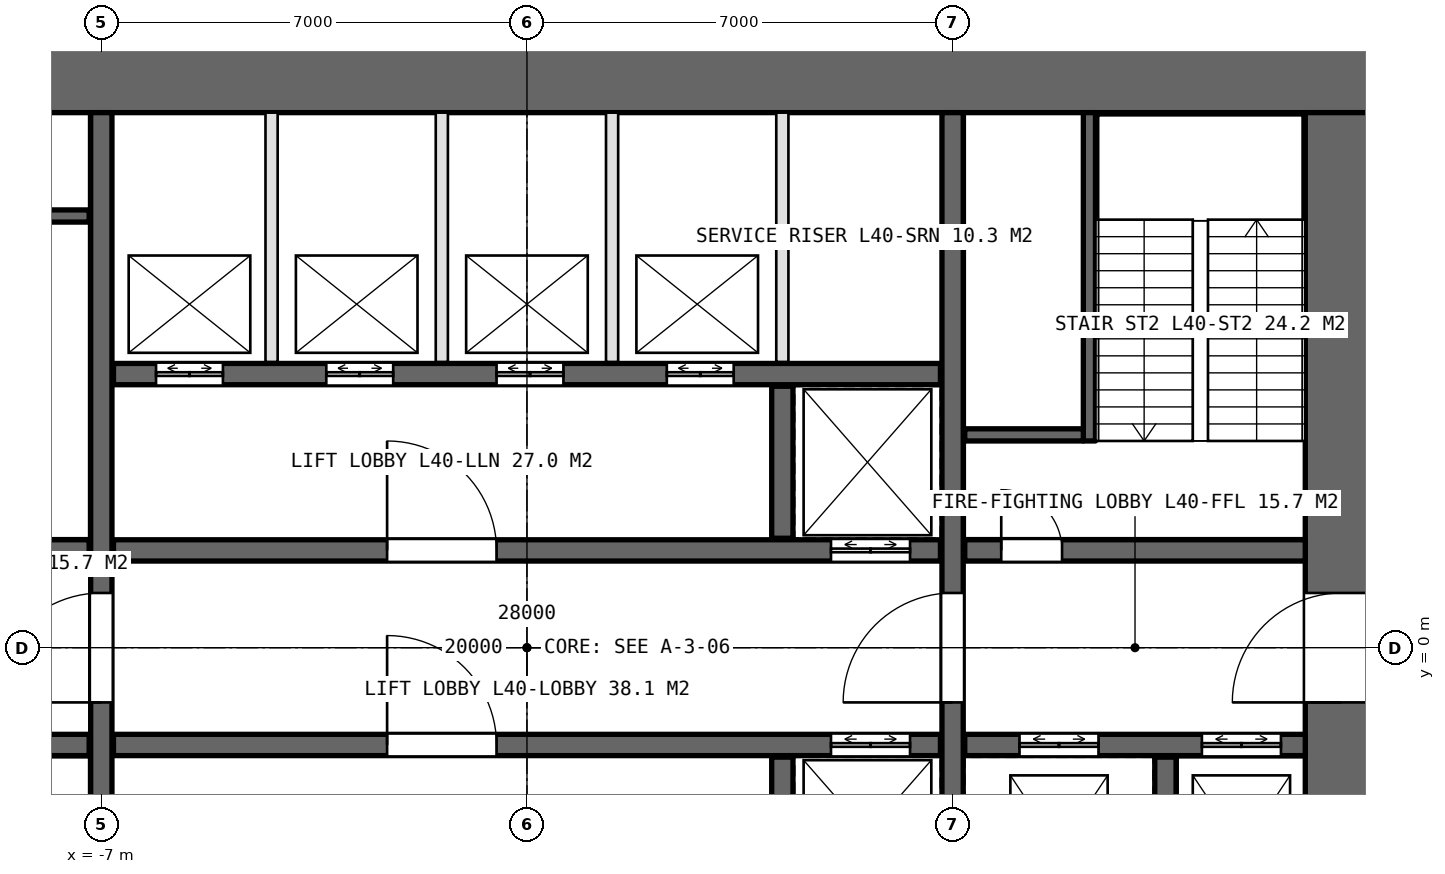
"""IFC4 building model, lengths in metres.
Left out: names, types, materials, properties, quantities, classifications, styles, units other than length and angle.
Written with IfcOpenShell. Run it as: python <this file> out.ifc"""

import sys

from ifc_helpers import new_model, si_unit, direction, frame, frame_2d, origin, place, context, subcontext, project, spatial, rectangle, extrude, element, fill, save


model = new_model("IFC4")
c1 = context("Model", 3, precision=1e-05, world=origin(), true_north=direction((0.0, 1.0)))
c2 = subcontext(c1, "Body", "Model", "MODEL_VIEW")
j1 = project(units=[si_unit("LENGTHUNIT", "METRE"), si_unit("PLANEANGLEUNIT", "RADIAN")], contexts=[c1])
p1 = place(None, origin())
s1 = spatial("IfcSite", under=j1, at=p1, CompositionType="ELEMENT")
p2 = place(p1, origin())
s2 = spatial("IfcBuilding", under=s1, at=p2, CompositionType="ELEMENT")
p3 = place(p2, frame((0.0, 0.0, 184.8)))
s3 = spatial("IfcBuildingStorey", under=s2, at=p3, CompositionType="ELEMENT", Elevation=184.8)
p4 = place(p3, frame((14.0, 9.4, 0.0), z_axis=(0.0, 0.0, 1.0), x_axis=(-1.0, 0.0, 0.0)))
e1 = element("IfcWall", 1, at=p4, inside=s3, PredefinedType="SHEAR", context=c2, shape_type="SweptSolid", body=[
    extrude(rectangle(XDim=28.0, YDim=1.2, at=frame_2d((14.0, 0.0))), origin(), (0.0, 0.0, 1.0), 5.0),
])
p5 = place(p4, frame((24.0, 0.0, 0.0)))
e2 = element("IfcOpeningElement", 2, at=p5, cuts=e1, PredefinedType="OPENING", context=c2, shape_type="SweptSolid", body=[
    extrude(rectangle(XDim=1.0, YDim=2.4, at=frame_2d((0.5, 1.2))), frame((0.0, 0.61, 0.0), z_axis=(0.0, -1.0, 0.0), x_axis=(1.0, 0.0, 0.0)), (0.0, 0.0, 1.0), 1.22),
])
p6 = place(p3, frame((13.4, -8.8, 0.0), z_axis=(0.0, 0.0, 1.0), x_axis=(0.0, 1.0, 0.0)))
e3 = element("IfcWall", 3, at=p6, inside=s3, PredefinedType="SHEAR", context=c2, shape_type="SweptSolid", body=[
    extrude(rectangle(XDim=17.6, YDim=1.2, at=frame_2d((8.8, 0.0))), origin(), (0.0, 0.0, 1.0), 5.0),
])
p7 = place(p6, frame((7.9, 0.0, 0.0)))
e4 = element("IfcOpeningElement", 4, at=p7, cuts=e3, PredefinedType="OPENING", context=c2, shape_type="SweptSolid", body=[
    extrude(rectangle(XDim=1.8, YDim=2.4, at=frame_2d((0.9, 1.2))), frame((0.0, 0.61, 0.0), z_axis=(0.0, -1.0, 0.0), x_axis=(1.0, 0.0, 0.0)), (0.0, 0.0, 1.0), 1.22),
])
p8 = place(p3, frame((-7.0, -8.8, 0.0), z_axis=(0.0, 0.0, 1.0), x_axis=(0.0, 1.0, 0.0)))
e5 = element("IfcWall", 5, at=p8, inside=s3, PredefinedType="SHEAR", context=c2, shape_type="SweptSolid", body=[
    extrude(rectangle(XDim=17.6, YDim=0.35, at=frame_2d((8.8, 0.0))), origin(), (0.0, 0.0, 1.0), 5.0),
])
p9 = place(p8, frame((7.9, 0.0, 0.0)))
e6 = element("IfcOpeningElement", 6, at=p9, cuts=e5, PredefinedType="OPENING", context=c2, shape_type="SweptSolid", body=[
    extrude(rectangle(XDim=1.8, YDim=2.4, at=frame_2d((0.9, 1.2))), frame((0.0, 0.185, 0.0), z_axis=(0.0, -1.0, 0.0), x_axis=(1.0, 0.0, 0.0)), (0.0, 0.0, 1.0), 0.37),
])
p10 = place(p3, frame((7.0, -8.8, 0.0), z_axis=(0.0, 0.0, 1.0), x_axis=(0.0, 1.0, 0.0)))
e7 = element("IfcWall", 7, at=p10, inside=s3, PredefinedType="SHEAR", context=c2, shape_type="SweptSolid", body=[
    extrude(rectangle(XDim=17.6, YDim=0.35, at=frame_2d((8.8, 0.0))), origin(), (0.0, 0.0, 1.0), 5.0),
])
p11 = place(p10, frame((7.9, 0.0, 0.0)))
e8 = element("IfcOpeningElement", 8, at=p11, cuts=e7, PredefinedType="OPENING", context=c2, shape_type="SweptSolid", body=[
    extrude(rectangle(XDim=1.8, YDim=2.4, at=frame_2d((0.9, 1.2))), frame((0.0, 0.185, 0.0), z_axis=(0.0, -1.0, 0.0), x_axis=(1.0, 0.0, 0.0)), (0.0, 0.0, 1.0), 0.37),
])
p12 = place(p3, frame((-6.8, 1.6, 0.0), z_axis=(0.0, 0.0, 1.0), x_axis=(1.0, 0.0, 0.0)))
e9 = element("IfcWall", 9, at=p12, inside=s3, PredefinedType="SHEAR", context=c2, shape_type="SweptSolid", body=[
    extrude(rectangle(XDim=13.6, YDim=0.35, at=frame_2d((6.8, 0.0))), origin(), (0.0, 0.0, 1.0), 5.0),
])
p13 = place(p12, frame((4.5, 0.0, 0.0)))
e10 = element("IfcOpeningElement", 10, at=p13, cuts=e9, PredefinedType="OPENING", context=c2, shape_type="SweptSolid", body=[
    extrude(rectangle(XDim=1.8, YDim=2.4, at=frame_2d((0.9, 1.2))), frame((0.0, 0.185, 0.0), z_axis=(0.0, -1.0, 0.0), x_axis=(1.0, 0.0, 0.0)), (0.0, 0.0, 1.0), 0.37),
])
p14 = place(p12, frame((11.8, 0.0, 0.0)))
e11 = element("IfcOpeningElement", 11, at=p14, cuts=e9, PredefinedType="OPENING", context=c2, shape_type="SweptSolid", body=[
    extrude(rectangle(XDim=1.3, YDim=2.4, at=frame_2d((0.65, 1.2))), frame((0.0, 0.185, 0.0), z_axis=(0.0, -1.0, 0.0), x_axis=(1.0, 0.0, 0.0)), (0.0, 0.0, 1.0), 0.37),
])
p15 = place(p3, frame((-6.8, -1.6, 0.0), z_axis=(0.0, 0.0, 1.0), x_axis=(1.0, 0.0, 0.0)))
e12 = element("IfcWall", 12, at=p15, inside=s3, PredefinedType="SHEAR", context=c2, shape_type="SweptSolid", body=[
    extrude(rectangle(XDim=13.6, YDim=0.35, at=frame_2d((6.8, 0.0))), origin(), (0.0, 0.0, 1.0), 5.0),
])
p16 = place(p15, frame((4.5, 0.0, 0.0)))
e13 = element("IfcOpeningElement", 13, at=p16, cuts=e12, PredefinedType="OPENING", context=c2, shape_type="SweptSolid", body=[
    extrude(rectangle(XDim=1.8, YDim=2.4, at=frame_2d((0.9, 1.2))), frame((0.0, 0.185, 0.0), z_axis=(0.0, -1.0, 0.0), x_axis=(1.0, 0.0, 0.0)), (0.0, 0.0, 1.0), 0.37),
])
p17 = place(p15, frame((11.8, 0.0, 0.0)))
e14 = element("IfcOpeningElement", 14, at=p17, cuts=e12, PredefinedType="OPENING", context=c2, shape_type="SweptSolid", body=[
    extrude(rectangle(XDim=1.3, YDim=2.4, at=frame_2d((0.65, 1.2))), frame((0.0, 0.185, 0.0), z_axis=(0.0, -1.0, 0.0), x_axis=(1.0, 0.0, 0.0)), (0.0, 0.0, 1.0), 0.37),
])
p18 = place(p3, frame((-6.8, 4.5, 0.0), z_axis=(0.0, 0.0, 1.0), x_axis=(1.0, 0.0, 0.0)))
e15 = element("IfcWall", 15, at=p18, inside=s3, PredefinedType="SHEAR", context=c2, shape_type="SweptSolid", body=[
    extrude(rectangle(XDim=13.6, YDim=0.35, at=frame_2d((6.8, 0.0))), origin(), (0.0, 0.0, 1.0), 5.0),
])
p19 = place(p18, frame((0.7, 0.0, 0.0)))
e16 = element("IfcOpeningElement", 16, at=p19, cuts=e15, PredefinedType="OPENING", context=c2, shape_type="SweptSolid", body=[
    extrude(rectangle(XDim=1.1, YDim=2.4, at=frame_2d((0.55, 1.2))), frame((0.0, 0.185, 0.0), z_axis=(0.0, -1.0, 0.0), x_axis=(1.0, 0.0, 0.0)), (0.0, 0.0, 1.0), 0.37),
])
p20 = place(p18, frame((3.5, 0.0, 0.0)))
e17 = element("IfcOpeningElement", 17, at=p20, cuts=e15, PredefinedType="OPENING", context=c2, shape_type="SweptSolid", body=[
    extrude(rectangle(XDim=1.1, YDim=2.4, at=frame_2d((0.55, 1.2))), frame((0.0, 0.185, 0.0), z_axis=(0.0, -1.0, 0.0), x_axis=(1.0, 0.0, 0.0)), (0.0, 0.0, 1.0), 0.37),
])
p21 = place(p18, frame((6.3, 0.0, 0.0)))
e18 = element("IfcOpeningElement", 18, at=p21, cuts=e15, PredefinedType="OPENING", context=c2, shape_type="SweptSolid", body=[
    extrude(rectangle(XDim=1.1, YDim=2.4, at=frame_2d((0.55, 1.2))), frame((0.0, 0.185, 0.0), z_axis=(0.0, -1.0, 0.0), x_axis=(1.0, 0.0, 0.0)), (0.0, 0.0, 1.0), 0.37),
])
p22 = place(p18, frame((9.1, 0.0, 0.0)))
e19 = element("IfcOpeningElement", 19, at=p22, cuts=e15, PredefinedType="OPENING", context=c2, shape_type="SweptSolid", body=[
    extrude(rectangle(XDim=1.1, YDim=2.4, at=frame_2d((0.55, 1.2))), frame((0.0, 0.185, 0.0), z_axis=(0.0, -1.0, 0.0), x_axis=(1.0, 0.0, 0.0)), (0.0, 0.0, 1.0), 0.37),
])
for number, where, z_axis, x_axis in (
    (20, (-12.8, 1.6, 0.0), (0.0, 0.0, 1.0), (1.0, 0.0, 0.0)),
    (21, (-12.8, -1.6, 0.0), (0.0, 0.0, 1.0), (1.0, 0.0, 0.0)),
):
    element("IfcWall", number, at=place(p3, frame(where, z_axis=z_axis, x_axis=x_axis)), inside=s3, PredefinedType="SHEAR", context=c2, shape_type="SweptSolid", body=[
        extrude(rectangle(XDim=5.6, YDim=0.35, at=frame_2d((2.8, 0.0))), origin(), (0.0, 0.0, 1.0), 5.0),
    ])
p23 = place(p3, frame((7.2, 1.6, 0.0), z_axis=(0.0, 0.0, 1.0), x_axis=(1.0, 0.0, 0.0)))
e22 = element("IfcWall", 22, at=p23, inside=s3, PredefinedType="SHEAR", context=c2, shape_type="SweptSolid", body=[
    extrude(rectangle(XDim=5.6, YDim=0.35, at=frame_2d((2.8, 0.0))), origin(), (0.0, 0.0, 1.0), 5.0),
])
p24 = place(p23, frame((0.6, 0.0, 0.0)))
e23 = element("IfcOpeningElement", 23, at=p24, cuts=e22, PredefinedType="OPENING", context=c2, shape_type="SweptSolid", body=[
    extrude(rectangle(XDim=1.0, YDim=2.4, at=frame_2d((0.5, 1.2))), frame((0.0, 0.185, 0.0), z_axis=(0.0, -1.0, 0.0), x_axis=(1.0, 0.0, 0.0)), (0.0, 0.0, 1.0), 0.37),
])
p25 = place(p3, frame((7.2, -1.6, 0.0), z_axis=(0.0, 0.0, 1.0), x_axis=(1.0, 0.0, 0.0)))
e24 = element("IfcWall", 24, at=p25, inside=s3, PredefinedType="SHEAR", context=c2, shape_type="SweptSolid", body=[
    extrude(rectangle(XDim=5.6, YDim=0.35, at=frame_2d((2.8, 0.0))), origin(), (0.0, 0.0, 1.0), 5.0),
])
p26 = place(p25, frame((0.9, 0.0, 0.0)))
e25 = element("IfcOpeningElement", 25, at=p26, cuts=e24, PredefinedType="OPENING", context=c2, shape_type="SweptSolid", body=[
    extrude(rectangle(XDim=1.3, YDim=2.4, at=frame_2d((0.65, 1.2))), frame((0.0, 0.185, 0.0), z_axis=(0.0, -1.0, 0.0), x_axis=(1.0, 0.0, 0.0)), (0.0, 0.0, 1.0), 0.37),
])
p27 = place(p25, frame((3.9, 0.0, 0.0)))
e26 = element("IfcOpeningElement", 26, at=p27, cuts=e24, PredefinedType="OPENING", context=c2, shape_type="SweptSolid", body=[
    extrude(rectangle(XDim=1.3, YDim=2.4, at=frame_2d((0.65, 1.2))), frame((0.0, 0.185, 0.0), z_axis=(0.0, -1.0, 0.0), x_axis=(1.0, 0.0, 0.0)), (0.0, 0.0, 1.0), 0.37),
])
p28 = place(p3, frame((10.5, -4.8, 0.0), z_axis=(0.0, 0.0, 1.0), x_axis=(0.0, 1.0, 0.0)))
e27 = element("IfcWall", 27, at=p28, inside=s3, PredefinedType="SHEAR", context=c2, shape_type="SweptSolid", body=[
    extrude(rectangle(XDim=3.0, YDim=0.35, at=frame_2d((1.5, 0.0))), origin(), (0.0, 0.0, 1.0), 5.0),
])
for number, where, z_axis, x_axis in (
    (28, (4.2, 1.8, 0.0), (0.0, 0.0, 1.0), (0.0, 1.0, 0.0)),
    (29, (4.2, -4.3, 0.0), (0.0, 0.0, 1.0), (0.0, 1.0, 0.0)),
):
    element("IfcWall", number, at=place(p3, frame(where, z_axis=z_axis, x_axis=x_axis)), inside=s3, PredefinedType="SHEAR", context=c2, shape_type="SweptSolid", body=[
        extrude(rectangle(XDim=2.5, YDim=0.35, at=frame_2d((1.25, 0.0))), origin(), (0.0, 0.0, 1.0), 5.0),
    ])
for number, where, z_axis, x_axis in (
    (30, (-4.2, 4.7, 0.0), (0.0, 0.0, 1.0), (0.0, 1.0, 0.0)),
    (31, (-1.4, 4.7, 0.0), (0.0, 0.0, 1.0), (0.0, 1.0, 0.0)),
    (32, (1.4, 4.7, 0.0), (0.0, 0.0, 1.0), (0.0, 1.0, 0.0)),
    (33, (4.2, 4.7, 0.0), (0.0, 0.0, 1.0), (0.0, 1.0, 0.0)),
):
    element("IfcWall", number, at=place(p3, frame(where, z_axis=z_axis, x_axis=x_axis)), inside=s3, PredefinedType="PARTITIONING", context=c2, shape_type="SweptSolid", body=[
        extrude(rectangle(XDim=4.1, YDim=0.2, at=frame_2d((2.05, 0.0))), origin(), (0.0, 0.0, 1.0), 5.0),
    ])
p29 = place(p3, frame((-9.15, 7.1, 0.0), z_axis=(0.0, 0.0, 1.0), x_axis=(1.0, 0.0, 0.0)))
e34 = element("IfcWall", 34, at=p29, inside=s3, PredefinedType="SOLIDWALL", context=c2, shape_type="SweptSolid", body=[
    extrude(rectangle(XDim=1.95, YDim=0.2, at=frame_2d((0.975, 0.0))), origin(), (0.0, 0.0, 1.0), 5.0),
])
p30 = place(p3, frame((9.25, 3.4, 0.0), z_axis=(0.0, 0.0, 1.0), x_axis=(0.0, 1.0, 0.0)))
e35 = element("IfcWall", 35, at=p30, inside=s3, PredefinedType="SOLIDWALL", context=c2, shape_type="SweptSolid", body=[
    extrude(rectangle(XDim=5.4, YDim=0.2, at=frame_2d((2.7, 0.0))), origin(), (0.0, 0.0, 1.0), 5.0),
])
p31 = place(p3, frame((9.15, 3.5, 0.0), z_axis=(0.0, 0.0, 1.0), x_axis=(-1.0, 0.0, 0.0)))
e36 = element("IfcWall", 36, at=p31, inside=s3, PredefinedType="SOLIDWALL", context=c2, shape_type="SweptSolid", body=[
    extrude(rectangle(XDim=1.95, YDim=0.2, at=frame_2d((0.975, 0.0))), origin(), (0.0, 0.0, 1.0), 5.0),
])
p32 = place(p7, origin())
e37 = element("IfcDoor", 37, at=p32, inside=s3, OperationType="DOUBLE_DOOR_SINGLE_SWING", PredefinedType="DOOR", context=c2, shape_type="SweptSolid", body=[
    extrude(rectangle(XDim=1.8, YDim=2.4, at=frame_2d((0.9, 1.2))), frame((0.0, 0.025, 0.0), z_axis=(0.0, -1.0, 0.0), x_axis=(1.0, 0.0, 0.0)), (0.0, 0.0, 1.0), 0.05),
])
fill(e4, e37)
p33 = place(p9, origin())
e38 = element("IfcDoor", 38, at=p33, inside=s3, OperationType="DOUBLE_DOOR_SINGLE_SWING", PredefinedType="DOOR", context=c2, shape_type="SweptSolid", body=[
    extrude(rectangle(XDim=1.8, YDim=2.4, at=frame_2d((0.9, 1.2))), frame((0.0, 0.025, 0.0), z_axis=(0.0, -1.0, 0.0), x_axis=(1.0, 0.0, 0.0)), (0.0, 0.0, 1.0), 0.05),
])
fill(e6, e38)
p34 = place(p11, origin())
e39 = element("IfcDoor", 39, at=p34, inside=s3, OperationType="DOUBLE_DOOR_SINGLE_SWING", PredefinedType="DOOR", context=c2, shape_type="SweptSolid", body=[
    extrude(rectangle(XDim=1.8, YDim=2.4, at=frame_2d((0.9, 1.2))), frame((0.0, 0.025, 0.0), z_axis=(0.0, -1.0, 0.0), x_axis=(1.0, 0.0, 0.0)), (0.0, 0.0, 1.0), 0.05),
])
fill(e8, e39)
p35 = place(p24, origin())
e40 = element("IfcDoor", 40, at=p35, inside=s3, OperationType="SINGLE_SWING_LEFT", PredefinedType="DOOR", context=c2, shape_type="SweptSolid", body=[
    extrude(rectangle(XDim=1.0, YDim=2.4, at=frame_2d((0.5, 1.2))), frame((0.0, 0.025, 0.0), z_axis=(0.0, -1.0, 0.0), x_axis=(1.0, 0.0, 0.0)), (0.0, 0.0, 1.0), 0.05),
])
fill(e23, e40)
p36 = place(p13, origin())
e41 = element("IfcDoor", 41, at=p36, inside=s3, OperationType="DOUBLE_DOOR_SINGLE_SWING", PredefinedType="DOOR", context=c2, shape_type="SweptSolid", body=[
    extrude(rectangle(XDim=1.8, YDim=2.4, at=frame_2d((0.9, 1.2))), frame((0.0, 0.025, 0.0), z_axis=(0.0, -1.0, 0.0), x_axis=(1.0, 0.0, 0.0)), (0.0, 0.0, 1.0), 0.05),
])
fill(e10, e41)
p37 = place(p16, origin())
e42 = element("IfcDoor", 42, at=p37, inside=s3, OperationType="DOUBLE_DOOR_SINGLE_SWING", PredefinedType="DOOR", context=c2, shape_type="SweptSolid", body=[
    extrude(rectangle(XDim=1.8, YDim=2.4, at=frame_2d((0.9, 1.2))), frame((0.0, 0.025, 0.0), z_axis=(0.0, -1.0, 0.0), x_axis=(1.0, 0.0, 0.0)), (0.0, 0.0, 1.0), 0.05),
])
fill(e13, e42)
p38 = place(p19, origin())
e43 = element("IfcDoor", 43, at=p38, inside=s3, OperationType="DOUBLE_DOOR_SLIDING", PredefinedType="DOOR", context=c2, shape_type="SweptSolid", body=[
    extrude(rectangle(XDim=1.1, YDim=2.4, at=frame_2d((0.55, 1.2))), frame((0.0, 0.025, 0.0), z_axis=(0.0, -1.0, 0.0), x_axis=(1.0, 0.0, 0.0)), (0.0, 0.0, 1.0), 0.05),
])
fill(e16, e43)
p39 = place(p20, origin())
e44 = element("IfcDoor", 44, at=p39, inside=s3, OperationType="DOUBLE_DOOR_SLIDING", PredefinedType="DOOR", context=c2, shape_type="SweptSolid", body=[
    extrude(rectangle(XDim=1.1, YDim=2.4, at=frame_2d((0.55, 1.2))), frame((0.0, 0.025, 0.0), z_axis=(0.0, -1.0, 0.0), x_axis=(1.0, 0.0, 0.0)), (0.0, 0.0, 1.0), 0.05),
])
fill(e17, e44)
p40 = place(p21, origin())
e45 = element("IfcDoor", 45, at=p40, inside=s3, OperationType="DOUBLE_DOOR_SLIDING", PredefinedType="DOOR", context=c2, shape_type="SweptSolid", body=[
    extrude(rectangle(XDim=1.1, YDim=2.4, at=frame_2d((0.55, 1.2))), frame((0.0, 0.025, 0.0), z_axis=(0.0, -1.0, 0.0), x_axis=(1.0, 0.0, 0.0)), (0.0, 0.0, 1.0), 0.05),
])
fill(e18, e45)
p41 = place(p22, origin())
e46 = element("IfcDoor", 46, at=p41, inside=s3, OperationType="DOUBLE_DOOR_SLIDING", PredefinedType="DOOR", context=c2, shape_type="SweptSolid", body=[
    extrude(rectangle(XDim=1.1, YDim=2.4, at=frame_2d((0.55, 1.2))), frame((0.0, 0.025, 0.0), z_axis=(0.0, -1.0, 0.0), x_axis=(1.0, 0.0, 0.0)), (0.0, 0.0, 1.0), 0.05),
])
fill(e19, e46)
p42 = place(p14, origin())
e47 = element("IfcDoor", 47, at=p42, inside=s3, OperationType="DOUBLE_DOOR_SLIDING", PredefinedType="DOOR", context=c2, shape_type="SweptSolid", body=[
    extrude(rectangle(XDim=1.3, YDim=2.4, at=frame_2d((0.65, 1.2))), frame((0.0, 0.025, 0.0), z_axis=(0.0, -1.0, 0.0), x_axis=(1.0, 0.0, 0.0)), (0.0, 0.0, 1.0), 0.05),
])
fill(e11, e47)
p43 = place(p17, origin())
e48 = element("IfcDoor", 48, at=p43, inside=s3, OperationType="DOUBLE_DOOR_SLIDING", PredefinedType="DOOR", context=c2, shape_type="SweptSolid", body=[
    extrude(rectangle(XDim=1.3, YDim=2.4, at=frame_2d((0.65, 1.2))), frame((0.0, 0.025, 0.0), z_axis=(0.0, -1.0, 0.0), x_axis=(1.0, 0.0, 0.0)), (0.0, 0.0, 1.0), 0.05),
])
fill(e14, e48)
p44 = place(p26, origin())
e49 = element("IfcDoor", 49, at=p44, inside=s3, OperationType="DOUBLE_DOOR_SLIDING", PredefinedType="DOOR", context=c2, shape_type="SweptSolid", body=[
    extrude(rectangle(XDim=1.3, YDim=2.4, at=frame_2d((0.65, 1.2))), frame((0.0, 0.025, 0.0), z_axis=(0.0, -1.0, 0.0), x_axis=(1.0, 0.0, 0.0)), (0.0, 0.0, 1.0), 0.05),
])
fill(e25, e49)
p45 = place(p27, origin())
e50 = element("IfcDoor", 50, at=p45, inside=s3, OperationType="DOUBLE_DOOR_SLIDING", PredefinedType="DOOR", context=c2, shape_type="SweptSolid", body=[
    extrude(rectangle(XDim=1.3, YDim=2.4, at=frame_2d((0.65, 1.2))), frame((0.0, 0.025, 0.0), z_axis=(0.0, -1.0, 0.0), x_axis=(1.0, 0.0, 0.0)), (0.0, 0.0, 1.0), 0.05),
])
fill(e26, e50)
save(model, sys.argv[1])
